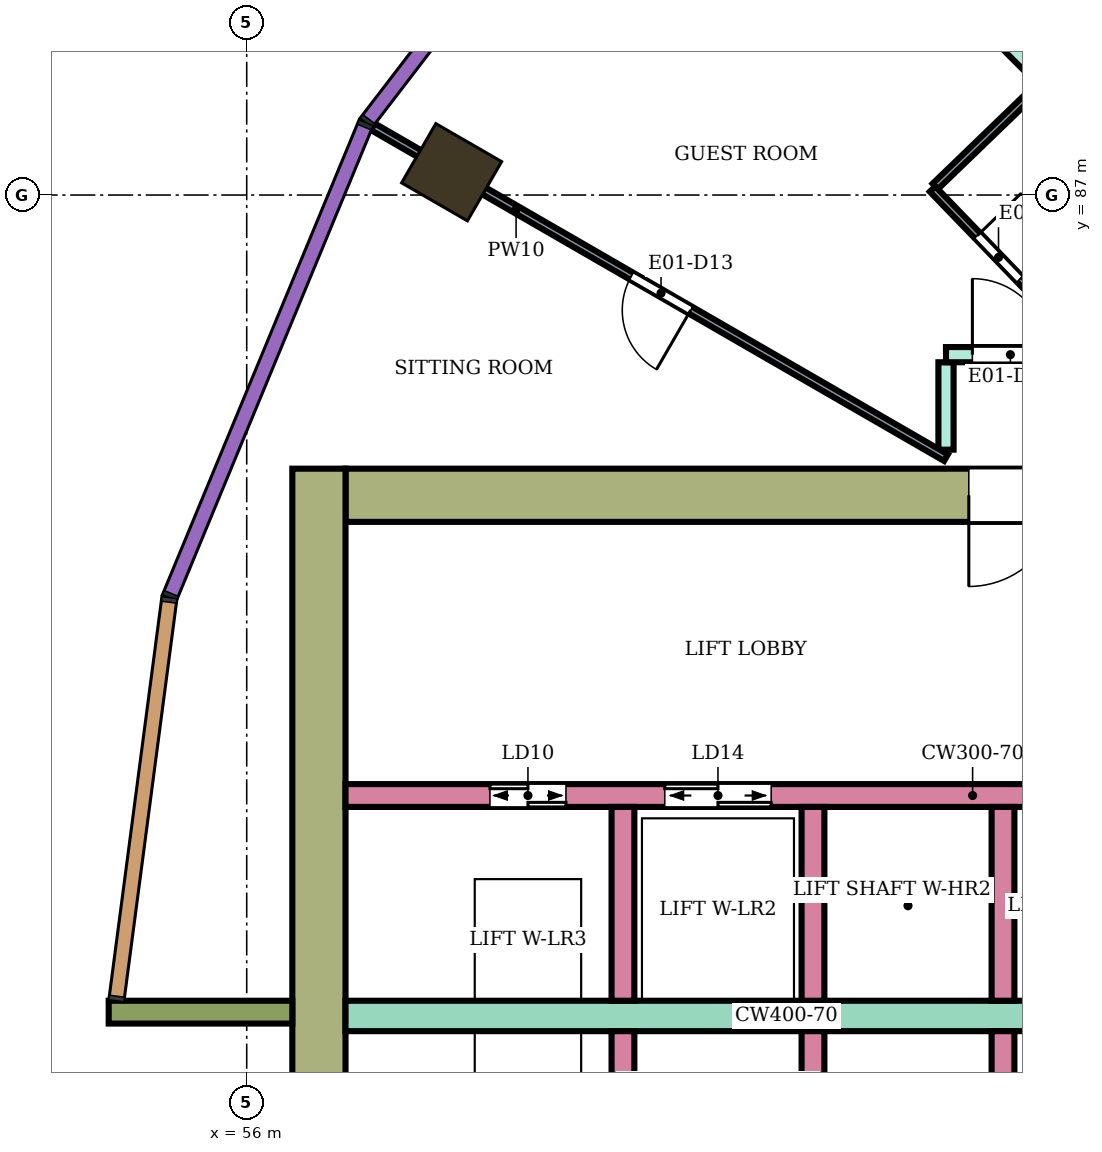
"""IFC4 building model, lengths in metres.
Left out: names, types, materials, properties, quantities, classifications, styles, units other than length and angle.
Written with IfcOpenShell. Run it as: python <this file> out.ifc"""

import sys

from ifc_helpers import new_model, si_unit, direction, frame, frame_2d, origin, origin_2d, place, context, subcontext, project, spatial, rectangle, extrude, element, fill, save


model = new_model("IFC4")
c1 = context("Model", 3, precision=1e-05, world=origin(), true_north=direction((0.0, 1.0)))
c2 = subcontext(c1, "Body", "Model", "MODEL_VIEW")
j1 = project(units=[si_unit("LENGTHUNIT", "METRE"), si_unit("PLANEANGLEUNIT", "RADIAN")], contexts=[c1])
p1 = place(None, origin())
s1 = spatial("IfcSite", under=j1, at=p1, CompositionType="ELEMENT")
p2 = place(p1, origin())
s2 = spatial("IfcBuilding", under=s1, at=p2, CompositionType="ELEMENT")
p3 = place(p2, frame((0.0, 0.0, 114.6)))
s3 = spatial("IfcBuildingStorey", under=s2, at=p3, CompositionType="ELEMENT", Elevation=114.6)
p4 = place(p3, frame((58.696, 87.3, 0.0), z_axis=(0.0, 0.0, 1.0), x_axis=(-0.866025403784, 0.5, 0.0)))
e1 = element("IfcColumn", 1, at=p4, inside=s3, PredefinedType="COLUMN", context=c2, shape_type="SweptSolid", body=[
    extrude(rectangle(XDim=1.0, YDim=0.9, at=origin_2d()), origin(), (0.0, 0.0, 1.0), 3.9),
])
p5 = place(p3, frame((72.1, 83.05, 0.0), z_axis=(0.0, 0.0, 1.0), x_axis=(-1.0, 0.0, 0.0)))
e2 = element("IfcWall", 2, at=p5, inside=s3, PredefinedType="SHEAR", context=c2, shape_type="SweptSolid", body=[
    extrude(rectangle(XDim=14.8, YDim=0.7, at=frame_2d((7.4, 0.0))), origin(), (0.0, 0.0, 1.0), 3.58),
])
p6 = place(p5, frame((4.2, 0.0, 0.0)))
e3 = element("IfcOpeningElement", 3, at=p6, cuts=e2, PredefinedType="OPENING", context=c2, shape_type="SweptSolid", body=[
    extrude(rectangle(XDim=2.4, YDim=2.4, at=frame_2d((1.2, 1.2))), frame((0.0, 0.36, 0.0), z_axis=(0.0, -1.0, 0.0), x_axis=(1.0, 0.0, 0.0)), (0.0, 0.0, 1.0), 0.72),
])
p7 = place(p3, frame((56.95, 83.4, 0.0), z_axis=(0.0, 0.0, 1.0), x_axis=(0.0, -1.0, 0.0)))
e4 = element("IfcWall", 4, at=p7, inside=s3, PredefinedType="SHEAR", context=c2, shape_type="SweptSolid", body=[
    extrude(rectangle(XDim=16.8, YDim=0.7, at=frame_2d((8.4, 0.0))), origin(), (0.0, 0.0, 1.0), 3.58),
])
p8 = place(p3, frame((68.3, 76.2, 0.0), z_axis=(0.0, 0.0, 1.0), x_axis=(-1.0, 0.0, 0.0)))
e5 = element("IfcWall", 5, at=p8, inside=s3, PredefinedType="SHEAR", context=c2, shape_type="SweptSolid", body=[
    extrude(rectangle(XDim=11.0, YDim=0.4, at=frame_2d((5.5, 0.0))), origin(), (0.0, 0.0, 1.0), 3.58),
])
p9 = place(p3, frame((68.3, 79.1, 0.0), z_axis=(0.0, 0.0, 1.0), x_axis=(-1.0, 0.0, 0.0)))
e6 = element("IfcWall", 6, at=p9, inside=s3, PredefinedType="SHEAR", context=c2, shape_type="SweptSolid", body=[
    extrude(rectangle(XDim=11.0, YDim=0.3, at=frame_2d((5.5, 0.0))), origin(), (0.0, 0.0, 1.0), 3.58),
])
p10 = place(p9, frame((0.4, 0.0, 0.0)))
e7 = element("IfcOpeningElement", 7, at=p10, cuts=e6, PredefinedType="OPENING", context=c2, shape_type="SweptSolid", body=[
    extrude(rectangle(XDim=1.4, YDim=2.1, at=frame_2d((0.7, 1.05))), frame((0.0, 0.16, 0.0), z_axis=(0.0, -1.0, 0.0), x_axis=(1.0, 0.0, 0.0)), (0.0, 0.0, 1.0), 0.32),
])
p11 = place(p9, frame((5.4, 0.0, 0.0)))
e8 = element("IfcOpeningElement", 8, at=p11, cuts=e6, PredefinedType="OPENING", context=c2, shape_type="SweptSolid", body=[
    extrude(rectangle(XDim=1.4, YDim=2.1, at=frame_2d((0.7, 1.05))), frame((0.0, 0.16, 0.0), z_axis=(0.0, -1.0, 0.0), x_axis=(1.0, 0.0, 0.0)), (0.0, 0.0, 1.0), 0.32),
])
p12 = place(p9, frame((8.1, 0.0, 0.0)))
e9 = element("IfcOpeningElement", 9, at=p12, cuts=e6, PredefinedType="OPENING", context=c2, shape_type="SweptSolid", body=[
    extrude(rectangle(XDim=1.0, YDim=2.1, at=frame_2d((0.5, 1.05))), frame((0.0, 0.16, 0.0), z_axis=(0.0, -1.0, 0.0), x_axis=(1.0, 0.0, 0.0)), (0.0, 0.0, 1.0), 0.32),
])
for number, where, z_axis, x_axis in (
    (10, (65.95, 76.0, 0.0), (0.0, 0.0, 1.0), (0.0, -1.0, 0.0)),
    (11, (63.45, 76.0, 0.0), (0.0, 0.0, 1.0), (0.0, -1.0, 0.0)),
    (12, (60.95, 76.0, 0.0), (0.0, 0.0, 1.0), (0.0, -1.0, 0.0)),
    (13, (65.95, 78.95, 0.0), (0.0, 0.0, 1.0), (0.0, -1.0, 0.0)),
    (14, (63.45, 78.95, 0.0), (0.0, 0.0, 1.0), (0.0, -1.0, 0.0)),
    (15, (60.95, 78.95, 0.0), (0.0, 0.0, 1.0), (0.0, -1.0, 0.0)),
):
    element("IfcWall", number, at=place(p3, frame(where, z_axis=z_axis, x_axis=x_axis)), inside=s3, PredefinedType="SHEAR", context=c2, shape_type="SweptSolid", body=[
        extrude(rectangle(XDim=2.55, YDim=0.3, at=frame_2d((1.275, 0.0))), origin(), (0.0, 0.0, 1.0), 3.58),
    ])
p13 = place(p3, frame((56.6, 76.25, 0.0), z_axis=(0.0, 0.0, 1.0), x_axis=(-1.0, 0.0, 0.0)))
e16 = element("IfcWall", 16, at=p13, inside=s3, PredefinedType="NOTDEFINED", context=c2, shape_type="SweptSolid", body=[
    extrude(rectangle(XDim=2.416, YDim=0.3, at=frame_2d((1.208, 0.0))), origin(), (0.0, 0.0, 1.0), 3.9),
])
p14 = place(p3, frame((63.598, 91.408, 0.0), z_axis=(0.0, 0.0, 1.0), x_axis=(0.706963264491, -0.707250268759, 0.0)))
e17 = element("IfcWall", 17, at=p14, inside=s3, PredefinedType="PARTITIONING", context=c2, shape_type="SweptSolid", body=[
    extrude(rectangle(XDim=6.805, YDim=0.2, at=frame_2d((3.403, 0.0))), origin(), (0.0, 0.0, 1.0), 3.45),
])
p15 = place(p3, frame((65.2, 83.65, 0.0), z_axis=(0.0, 0.0, 1.0), x_axis=(0.0, 1.0, 0.0)))
e18 = element("IfcWall", 18, at=p15, inside=s3, PredefinedType="PARTITIONING", context=c2, shape_type="SweptSolid", body=[
    extrude(rectangle(XDim=1.15, YDim=0.2, at=frame_2d((0.575, 0.0))), origin(), (0.0, 0.0, 1.0), 3.45),
])
p16 = place(p3, frame((65.2, 84.9, 0.0), z_axis=(0.0, 0.0, 1.0), x_axis=(1.0, 0.0, 0.0)))
e19 = element("IfcWall", 19, at=p16, inside=s3, PredefinedType="PARTITIONING", context=c2, shape_type="SweptSolid", body=[
    extrude(rectangle(XDim=1.537, YDim=0.2, at=frame_2d((0.769, 0.0))), origin(), (0.0, 0.0, 1.0), 3.45),
])
p17 = place(p16, frame((0.347, 0.0, 0.0)))
e20 = element("IfcOpeningElement", 20, at=p17, cuts=e19, PredefinedType="OPENING", context=c2, shape_type="SweptSolid", body=[
    extrude(rectangle(XDim=1.0, YDim=2.1, at=frame_2d((0.5, 1.05))), frame((0.0, 0.11, 0.0), z_axis=(0.0, -1.0, 0.0), x_axis=(1.0, 0.0, 0.0)), (0.0, 0.0, 1.0), 0.22),
])
p18 = place(p3, frame((57.659, 87.899, 0.0), z_axis=(0.0, 0.0, 1.0), x_axis=(0.86602264145, -0.500004784474, 0.0)))
e21 = element("IfcWall", 21, at=p18, inside=s3, PredefinedType="PARTITIONING", context=c2, shape_type="SweptSolid", body=[
    extrude(rectangle(XDim=8.708, YDim=0.1, at=frame_2d((4.354, 0.0))), origin(), (0.0, 0.0, 1.0), 3.45),
])
p19 = place(p18, frame((3.929, 0.0, 0.0)))
e22 = element("IfcOpeningElement", 22, at=p19, cuts=e21, PredefinedType="OPENING", context=c2, shape_type="SweptSolid", body=[
    extrude(rectangle(XDim=0.9, YDim=2.1, at=frame_2d((0.45, 1.05))), frame((0.0, 0.06, 0.0), z_axis=(0.0, -1.0, 0.0), x_axis=(1.0, 0.0, 0.0)), (0.0, 0.0, 1.0), 0.12),
])
p20 = place(p3, frame((65.059, 87.114, 0.0), z_axis=(0.0, 0.0, 1.0), x_axis=(0.719715847356, 0.694268751324, 0.0)))
e23 = element("IfcWall", 23, at=p20, inside=s3, PredefinedType="PARTITIONING", context=c2, shape_type="SweptSolid", body=[
    extrude(rectangle(XDim=1.9, YDim=0.1, at=frame_2d((0.95, 0.0))), origin(), (0.0, 0.0, 1.0), 3.45),
])
p21 = place(p3, frame((65.023, 87.079, 0.0), z_axis=(0.0, 0.0, 1.0), x_axis=(0.694287838235, -0.719697434815, 0.0)))
e24 = element("IfcWall", 24, at=p21, inside=s3, PredefinedType="PARTITIONING", context=c2, shape_type="SweptSolid", body=[
    extrude(rectangle(XDim=2.7, YDim=0.1, at=frame_2d((1.35, 0.0))), origin(), (0.0, 0.0, 1.0), 3.45),
])
p22 = place(p21, frame((0.85, 0.0, 0.0)))
e25 = element("IfcOpeningElement", 25, at=p22, cuts=e24, PredefinedType="OPENING", context=c2, shape_type="SweptSolid", body=[
    extrude(rectangle(XDim=0.8, YDim=2.1, at=frame_2d((0.4, 1.05))), frame((0.0, 0.06, 0.0), z_axis=(0.0, -1.0, 0.0), x_axis=(1.0, 0.0, 0.0)), (0.0, 0.0, 1.0), 0.12),
])
p23 = place(p17, origin())
e26 = element("IfcDoor", 26, at=p23, inside=s3, OperationType="SINGLE_SWING_LEFT", PredefinedType="DOOR", context=c2, shape_type="SweptSolid", body=[
    extrude(rectangle(XDim=1.0, YDim=2.1, at=frame_2d((0.5, 1.05))), frame((0.0, 0.025, 0.0), z_axis=(0.0, -1.0, 0.0), x_axis=(1.0, 0.0, 0.0)), (0.0, 0.0, 1.0), 0.05),
])
fill(e20, e26)
p24 = place(p22, origin())
e27 = element("IfcDoor", 27, at=p24, inside=s3, OperationType="SINGLE_SWING_LEFT", PredefinedType="DOOR", context=c2, shape_type="SweptSolid", body=[
    extrude(rectangle(XDim=0.8, YDim=2.1, at=frame_2d((0.4, 1.05))), frame((0.0, 0.025, 0.0), z_axis=(0.0, -1.0, 0.0), x_axis=(1.0, 0.0, 0.0)), (0.0, 0.0, 1.0), 0.05),
])
fill(e25, e27)
p25 = place(p19, frame((0.9, 0.0, 0.0), z_axis=(0.0, 0.0, 1.0), x_axis=(-1.0, 0.0, 0.0)))
e28 = element("IfcDoor", 28, at=p25, inside=s3, OperationType="SINGLE_SWING_LEFT", PredefinedType="DOOR", context=c2, shape_type="SweptSolid", body=[
    extrude(rectangle(XDim=0.9, YDim=2.1, at=frame_2d((0.45, 1.05))), frame((0.0, 0.025, 0.0), z_axis=(0.0, -1.0, 0.0), x_axis=(1.0, 0.0, 0.0)), (0.0, 0.0, 1.0), 0.05),
])
fill(e22, e28)
p26 = place(p11, origin())
e29 = element("IfcDoor", 29, at=p26, inside=s3, OperationType="DOUBLE_DOOR_SLIDING", PredefinedType="DOOR", context=c2, shape_type="SweptSolid", body=[
    extrude(rectangle(XDim=1.4, YDim=2.1, at=frame_2d((0.7, 1.05))), frame((0.0, 0.025, 0.0), z_axis=(0.0, -1.0, 0.0), x_axis=(1.0, 0.0, 0.0)), (0.0, 0.0, 1.0), 0.05),
])
fill(e8, e29)
p27 = place(p12, origin())
e30 = element("IfcDoor", 30, at=p27, inside=s3, OperationType="DOUBLE_DOOR_SLIDING", PredefinedType="DOOR", context=c2, shape_type="SweptSolid", body=[
    extrude(rectangle(XDim=1.0, YDim=2.1, at=frame_2d((0.5, 1.05))), frame((0.0, 0.025, 0.0), z_axis=(0.0, -1.0, 0.0), x_axis=(1.0, 0.0, 0.0)), (0.0, 0.0, 1.0), 0.05),
])
fill(e9, e30)
p28 = place(p6, origin())
e31 = element("IfcDoor", 31, at=p28, inside=s3, OperationType="DOUBLE_DOOR_SINGLE_SWING", PredefinedType="DOOR", context=c2, shape_type="SweptSolid", body=[
    extrude(rectangle(XDim=2.4, YDim=2.4, at=frame_2d((1.2, 1.2))), frame((0.0, 0.025, 0.0), z_axis=(0.0, -1.0, 0.0), x_axis=(1.0, 0.0, 0.0)), (0.0, 0.0, 1.0), 0.05),
])
fill(e3, e31)
save(model, sys.argv[1])
